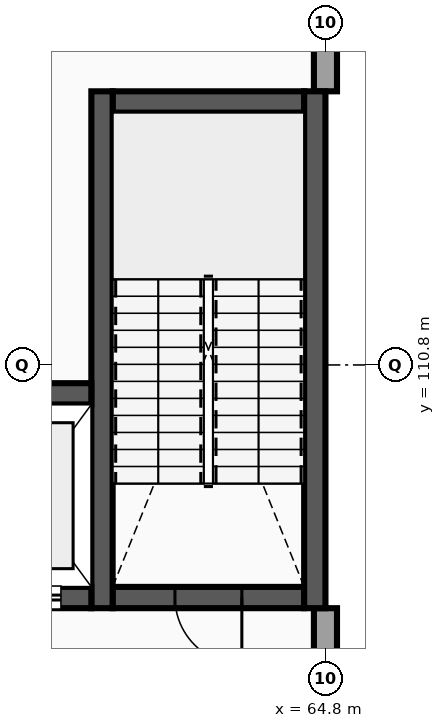
"""IFC4 building model, lengths in metres.
Left out: names, types, materials, properties, quantities, classifications, styles, units other than length and angle.
Written with IfcOpenShell. Run it as: python <this file> out.ifc"""

import sys

from ifc_helpers import new_model, si_unit, direction, frame, frame_2d, origin, place, context, subcontext, project, spatial, rectangle, extrude, element, fill, save


model = new_model("IFC4")
c1 = context("Model", 3, precision=1e-05, world=origin(), true_north=direction((0.0, 1.0)))
c2 = subcontext(c1, "Body", "Model", "MODEL_VIEW")
j1 = project(units=[si_unit("LENGTHUNIT", "METRE"), si_unit("PLANEANGLEUNIT", "RADIAN")], contexts=[c1])
p1 = place(None, origin())
s1 = spatial("IfcSite", under=j1, at=p1, CompositionType="ELEMENT")
p2 = place(p1, origin())
s2 = spatial("IfcBuilding", under=s1, at=p2, CompositionType="ELEMENT")
p3 = place(p2, frame((0.0, 0.0, 5.2)))
s3 = spatial("IfcBuildingStorey", under=s2, at=p3, CompositionType="ELEMENT", Elevation=5.2)
p4 = place(p3, frame((64.8, 103.6, 0.0), z_axis=(0.0, 0.0, 1.0), x_axis=(0.0, 1.0, 0.0)))
e1 = element("IfcWall", 1, at=p4, inside=s3, PredefinedType="STANDARD", context=c2, shape_type="SweptSolid", body=[
    extrude(rectangle(XDim=3.2, YDim=0.38, at=frame_2d((1.6, 0.0))), origin(), (0.0, 0.0, 1.0), 4.185),
])
p5 = place(p4, frame((1.119, 0.0, 0.95)))
e2 = element("IfcOpeningElement", 2, at=p5, cuts=e1, PredefinedType="OPENING", context=c2, shape_type="SweptSolid", body=[
    extrude(rectangle(XDim=0.962, YDim=1.404, at=frame_2d((0.481, 0.702))), frame((0.0, 0.2, 0.0), z_axis=(0.0, -1.0, 0.0), x_axis=(1.0, 0.0, 0.0)), (0.0, 0.0, 1.0), 0.4),
])
p6 = place(p3, frame((64.8, 115.3, 0.0), z_axis=(0.0, 0.0, 1.0), x_axis=(0.0, 1.0, 0.0)))
e3 = element("IfcWall", 3, at=p6, inside=s3, PredefinedType="STANDARD", context=c2, shape_type="SweptSolid", body=[
    extrude(rectangle(XDim=2.51, YDim=0.38, at=frame_2d((1.255, 0.0))), origin(), (0.0, 0.0, 1.0), 4.185),
])
p7 = place(p3, frame((61.3, 106.975, 0.0), z_axis=(0.0, 0.0, 1.0), x_axis=(1.0, 0.0, 0.0)))
e4 = element("IfcWall", 4, at=p7, inside=s3, PredefinedType="SHEAR", context=c2, shape_type="SweptSolid", body=[
    extrude(rectangle(XDim=3.15, YDim=0.35, at=frame_2d((1.575, 0.0))), origin(), (0.0, 0.0, 1.0), 4.185),
])
p8 = place(p7, frame((1.025, 0.0, 0.0)))
e5 = element("IfcOpeningElement", 5, at=p8, cuts=e4, PredefinedType="OPENING", context=c2, shape_type="SweptSolid", body=[
    extrude(rectangle(XDim=1.1, YDim=2.15, at=frame_2d((0.55, 1.075))), frame((0.0, 0.185, 0.0), z_axis=(0.0, -1.0, 0.0), x_axis=(1.0, 0.0, 0.0)), (0.0, 0.0, 1.0), 0.37),
])
p9 = place(p3, frame((61.3, 115.125, 0.0), z_axis=(0.0, 0.0, 1.0), x_axis=(1.0, 0.0, 0.0)))
e6 = element("IfcWall", 6, at=p9, inside=s3, PredefinedType="SHEAR", context=c2, shape_type="SweptSolid", body=[
    extrude(rectangle(XDim=3.15, YDim=0.35, at=frame_2d((1.575, 0.0))), origin(), (0.0, 0.0, 1.0), 4.185),
])
for number, where, z_axis, x_axis in (
    (7, (61.125, 106.8, 0.0), (0.0, 0.0, 1.0), (0.0, 1.0, 0.0)),
    (8, (64.625, 106.8, 0.0), (0.0, 0.0, 1.0), (0.0, 1.0, 0.0)),
):
    element("IfcWall", number, at=place(p3, frame(where, z_axis=z_axis, x_axis=x_axis)), inside=s3, PredefinedType="SHEAR", context=c2, shape_type="SweptSolid", body=[
        extrude(rectangle(XDim=8.5, YDim=0.35, at=frame_2d((4.25, 0.0))), origin(), (0.0, 0.0, 1.0), 4.185),
    ])
p10 = place(p3, frame((58.75, 106.975, 0.0), z_axis=(0.0, 0.0, 1.0), x_axis=(1.0, 0.0, 0.0)))
e9 = element("IfcWall", 9, at=p10, inside=s3, PredefinedType="SHEAR", context=c2, shape_type="SweptSolid", body=[
    extrude(rectangle(XDim=2.2, YDim=0.35, at=frame_2d((1.1, 0.0))), origin(), (0.0, 0.0, 1.0), 4.185),
])
p11 = place(p10, frame((0.5, 0.0, 0.0)))
e10 = element("IfcOpeningElement", 10, at=p11, cuts=e9, PredefinedType="OPENING", context=c2, shape_type="SweptSolid", body=[
    extrude(rectangle(XDim=1.2, YDim=2.2, at=frame_2d((0.6, 1.1))), frame((0.0, 0.185, 0.0), z_axis=(0.0, -1.0, 0.0), x_axis=(1.0, 0.0, 0.0)), (0.0, 0.0, 1.0), 0.37),
])
p12 = place(p3, frame((58.75, 110.325, 0.0), z_axis=(0.0, 0.0, 1.0), x_axis=(1.0, 0.0, 0.0)))
e11 = element("IfcWall", 11, at=p12, inside=s3, PredefinedType="SHEAR", context=c2, shape_type="SweptSolid", body=[
    extrude(rectangle(XDim=2.2, YDim=0.35, at=frame_2d((1.1, 0.0))), origin(), (0.0, 0.0, 1.0), 4.185),
])
p13 = place(p8, origin())
e12 = element("IfcDoor", 12, at=p13, inside=s3, OperationType="SINGLE_SWING_RIGHT", PredefinedType="DOOR", context=c2, shape_type="SweptSolid", body=[
    extrude(rectangle(XDim=1.1, YDim=2.15, at=frame_2d((0.55, 1.075))), frame((0.0, 0.025, 0.0), z_axis=(0.0, -1.0, 0.0), x_axis=(1.0, 0.0, 0.0)), (0.0, 0.0, 1.0), 0.05),
])
fill(e5, e12)
p14 = place(p11, origin())
e13 = element("IfcDoor", 13, at=p14, inside=s3, OperationType="SLIDING_TO_RIGHT", PredefinedType="DOOR", context=c2, shape_type="SweptSolid", body=[
    extrude(rectangle(XDim=1.2, YDim=2.2, at=frame_2d((0.6, 1.1))), frame((0.0, 0.025, 0.0), z_axis=(0.0, -1.0, 0.0), x_axis=(1.0, 0.0, 0.0)), (0.0, 0.0, 1.0), 0.05),
])
fill(e10, e13)
save(model, sys.argv[1])
